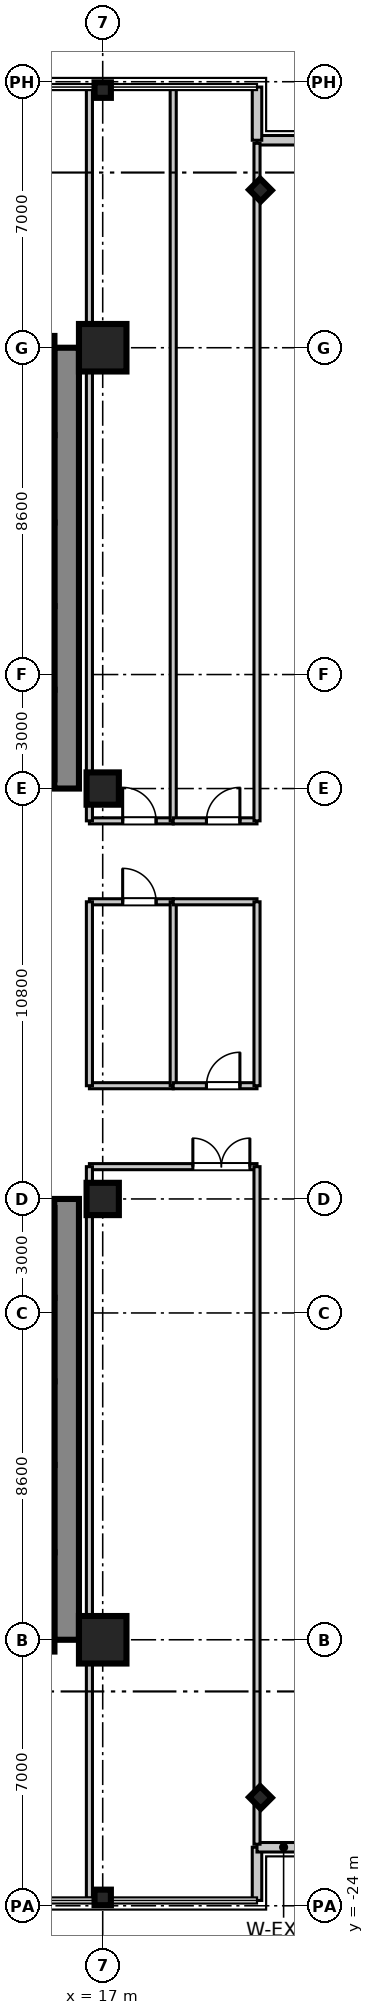
"""IFC4 building model, lengths in metres.
Left out: names, types, materials, properties, quantities, classifications, styles, units other than length and angle.
Written with IfcOpenShell. Run it as: python <this file> out.ifc"""

import sys

from ifc_helpers import new_model, si_unit, direction, frame, frame_2d, origin, origin_2d, place, context, subcontext, project, spatial, rectangle, i_section, extrude, source, transform, mapped, element, fill, save


model = new_model("IFC4")
c1 = context("Model", 3, precision=1e-05, world=origin(), true_north=direction((0.0, 1.0)))
c2 = subcontext(c1, "Body", "Model", "MODEL_VIEW")
j1 = project(units=[si_unit("LENGTHUNIT", "METRE"), si_unit("PLANEANGLEUNIT", "RADIAN")], contexts=[c1])
p1 = place(None, origin())
s1 = spatial("IfcSite", under=j1, at=p1, CompositionType="ELEMENT")
p2 = place(p1, origin())
s2 = spatial("IfcBuilding", under=s1, at=p2, CompositionType="ELEMENT")
p3 = place(p2, frame((0.0, 0.0, 95.6)))
s3 = spatial("IfcBuildingStorey", under=s2, at=p3, CompositionType="ELEMENT", Elevation=95.6)
m1 = source(origin(), c2, "Body", "SweptSolid", [
    extrude(rectangle(XDim=1.25, YDim=1.25, at=origin_2d()), origin(), (0.0, 0.0, 1.0), 3.605),
])
p4 = place(p3, frame((17.0, -17.0, 0.0), z_axis=(0.0, 0.0, 1.0), x_axis=(1.0, 0.0, 0.0)))
e1 = element("IfcColumn", 1, at=p4, inside=s3, PredefinedType="COLUMN", context=c2, shape_type="MappedRepresentation", body=[
    mapped(m1, transform((0.0, 0.0, 0.0), scale=1.0)),
])
m2 = source(origin(), c2, "Body", "SweptSolid", [
    extrude(rectangle(XDim=0.85, YDim=0.85, at=origin_2d()), origin(), (0.0, 0.0, 1.0), 3.605),
])
for number, where, z_axis, x_axis in (
    (2, (17.0, -5.4, 0.0), (0.0, 0.0, 1.0), (1.0, 0.0, 0.0)),
    (3, (17.0, 5.4, 0.0), (0.0, 0.0, 1.0), (1.0, 0.0, 0.0)),
):
    element("IfcColumn", number, at=place(p3, frame(where, z_axis=z_axis, x_axis=x_axis)), inside=s3, PredefinedType="PILASTER", context=c2, shape_type="MappedRepresentation", body=[
        mapped(m2, transform((0.0, 0.0, 0.0), scale=1.0)),
    ])
p5 = place(p3, frame((17.0, 17.0, 0.0), z_axis=(0.0, 0.0, 1.0), x_axis=(1.0, 0.0, 0.0)))
e4 = element("IfcColumn", 4, at=p5, inside=s3, PredefinedType="COLUMN", context=c2, shape_type="MappedRepresentation", body=[
    mapped(m1, transform((0.0, 0.0, 0.0), scale=1.0)),
])
m3 = source(origin(), c2, "Body", "SweptSolid", [
    extrude(i_section(OverallWidth=0.409, OverallDepth=0.43, WebThickness=0.021, FlangeThickness=0.034, at=origin_2d()), origin(), (0.0, 0.0, 1.0), 3.605),
])
for number, where, z_axis, x_axis in (
    (5, (17.0, -23.78, 0.0), (0.0, 0.0, 1.0), (0.0, 1.0, 0.0)),
    (6, (17.0, 23.78, 0.0), (0.0, 0.0, 1.0), (0.0, 1.0, 0.0)),
    (7, (21.15, -21.15, 0.0), (0.0, 0.0, 1.0), (0.707, 0.707, 0.0)),
    (8, (21.15, 21.15, 0.0), (0.0, 0.0, 1.0), (0.707, 0.707, 0.0)),
):
    element("IfcColumn", number, at=place(p3, frame(where, z_axis=z_axis, x_axis=x_axis)), inside=s3, PredefinedType="COLUMN", context=c2, shape_type="MappedRepresentation", body=[
        mapped(m3, transform((0.0, 0.0, 0.0), scale=1.0)),
    ])
m4 = source(origin(), c2, "Body", "SweptSolid", [
    extrude(rectangle(XDim=11.6, YDim=0.65, at=frame_2d((5.8, 0.0))), origin(), (0.0, 0.0, 1.0), 3.38),
])
for number, where, z_axis, x_axis in (
    (9, (16.05, 5.4, 0.0), (0.0, 0.0, 1.0), (0.0, 1.0, 0.0)),
    (10, (16.05, -17.0, 0.0), (0.0, 0.0, 1.0), (0.0, 1.0, 0.0)),
):
    element("IfcWall", number, at=place(p3, frame(where, z_axis=z_axis, x_axis=x_axis)), inside=s3, PredefinedType="SHEAR", context=c2, shape_type="MappedRepresentation", body=[
        mapped(m4, transform((0.0, 0.0, 0.0), scale=1.0)),
    ])
m5 = source(origin(), c2, "Body", "SweptSolid", [
    extrude(rectangle(XDim=2.36, YDim=0.22, at=frame_2d((1.18, 0.0))), origin(), (0.0, 0.0, 1.0), 3.38),
])
p6 = place(p3, frame((15.62, 5.64, 0.0), z_axis=(0.0, 0.0, 1.0), x_axis=(0.0, 1.0, 0.0)))
e11 = element("IfcWall", 11, at=p6, inside=s3, PredefinedType="SHEAR", context=c2, shape_type="MappedRepresentation", body=[
    mapped(m5, transform((0.0, 0.0, 0.0), scale=1.0)),
])
m6 = source(origin(), c2, "Body", "SweptSolid", [
    extrude(rectangle(XDim=2.2, YDim=0.22, at=frame_2d((1.1, 0.0))), origin(), (0.0, 0.0, 1.0), 3.38),
])
for number, where, z_axis, x_axis in (
    (12, (15.62, 8.0, 0.0), (0.0, 0.0, 1.0), (0.0, 1.0, 0.0)),
    (13, (15.62, 10.2, 0.0), (0.0, 0.0, 1.0), (0.0, 1.0, 0.0)),
):
    element("IfcWall", number, at=place(p3, frame(where, z_axis=z_axis, x_axis=x_axis)), inside=s3, PredefinedType="SHEAR", context=c2, shape_type="MappedRepresentation", body=[
        mapped(m6, transform((0.0, 0.0, 0.0), scale=1.0)),
    ])
m7 = source(origin(), c2, "Body", "SweptSolid", [
    extrude(rectangle(XDim=2.3, YDim=0.22, at=frame_2d((1.15, 0.0))), origin(), (0.0, 0.0, 1.0), 3.38),
])
p7 = place(p3, frame((15.62, 12.4, 0.0), z_axis=(0.0, 0.0, 1.0), x_axis=(0.0, 1.0, 0.0)))
e14 = element("IfcWall", 14, at=p7, inside=s3, PredefinedType="SHEAR", context=c2, shape_type="MappedRepresentation", body=[
    mapped(m7, transform((0.0, 0.0, 0.0), scale=1.0)),
])
p8 = place(p3, frame((15.62, -8.0, 0.0), z_axis=(0.0, 0.0, 1.0), x_axis=(0.0, 1.0, 0.0)))
e15 = element("IfcWall", 15, at=p8, inside=s3, PredefinedType="SHEAR", context=c2, shape_type="MappedRepresentation", body=[
    mapped(m5, transform((0.0, 0.0, 0.0), scale=1.0)),
])
for number, where, z_axis, x_axis in (
    (16, (15.62, -10.2, 0.0), (0.0, 0.0, 1.0), (0.0, 1.0, 0.0)),
    (17, (15.62, -12.4, 0.0), (0.0, 0.0, 1.0), (0.0, 1.0, 0.0)),
):
    element("IfcWall", number, at=place(p3, frame(where, z_axis=z_axis, x_axis=x_axis)), inside=s3, PredefinedType="SHEAR", context=c2, shape_type="MappedRepresentation", body=[
        mapped(m6, transform((0.0, 0.0, 0.0), scale=1.0)),
    ])
p9 = place(p3, frame((15.62, -14.7, 0.0), z_axis=(0.0, 0.0, 1.0), x_axis=(0.0, 1.0, 0.0)))
e18 = element("IfcWall", 18, at=p9, inside=s3, PredefinedType="SHEAR", context=c2, shape_type="MappedRepresentation", body=[
    mapped(m7, transform((0.0, 0.0, 0.0), scale=1.0)),
])
m8 = source(origin(), c2, "Body", "SweptSolid", [
    extrude(rectangle(XDim=2.61, YDim=0.22, at=frame_2d((1.305, 0.0))), origin(), (0.0, 0.0, 1.0), 3.38),
])
for number, where, z_axis, x_axis in (
    (19, (15.62, 14.7, 0.0), (0.0, 0.0, 1.0), (0.0, 1.0, 0.0)),
    (20, (15.62, -17.31, 0.0), (0.0, 0.0, 1.0), (0.0, 1.0, 0.0)),
):
    element("IfcWall", number, at=place(p3, frame(where, z_axis=z_axis, x_axis=x_axis)), inside=s3, PredefinedType="SHEAR", context=c2, shape_type="MappedRepresentation", body=[
        mapped(m8, transform((0.0, 0.0, 0.0), scale=1.0)),
    ])
m9 = source(origin(), c2, "Body", "SweptSolid", [
    extrude(rectangle(XDim=1.4, YDim=0.25, at=frame_2d((0.7, 0.0))), origin(), (0.0, 0.0, 1.0), 3.38),
])
p10 = place(p3, frame((21.06, -23.86, 0.0), z_axis=(0.0, 0.0, 1.0), x_axis=(0.0, 1.0, 0.0)))
e21 = element("IfcWall", 21, at=p10, inside=s3, PredefinedType="STANDARD", context=c2, shape_type="MappedRepresentation", body=[
    mapped(m9, transform((0.0, 0.0, 0.0), scale=1.0)),
])
m10 = source(origin(), c2, "Body", "SweptSolid", [
    extrude(rectangle(XDim=1.4, YDim=0.25, at=frame_2d((0.7, 0.0))), origin(), (0.0, 0.0, 1.0), 3.38),
])
for number, where, z_axis, x_axis in (
    (22, (21.06, -22.46, 0.0), (0.0, 0.0, 1.0), (1.0, 0.0, 0.0)),
    (23, (21.06, 22.46, 0.0), (0.0, 0.0, 1.0), (1.0, 0.0, 0.0)),
):
    element("IfcWall", number, at=place(p3, frame(where, z_axis=z_axis, x_axis=x_axis)), inside=s3, PredefinedType="STANDARD", context=c2, shape_type="MappedRepresentation", body=[
        mapped(m10, transform((0.0, 0.0, 0.0), scale=1.0)),
    ])
p11 = place(p3, frame((21.06, 22.46, 0.0), z_axis=(0.0, 0.0, 1.0), x_axis=(0.0, 1.0, 0.0)))
e24 = element("IfcWall", 24, at=p11, inside=s3, PredefinedType="STANDARD", context=c2, shape_type="MappedRepresentation", body=[
    mapped(m9, transform((0.0, 0.0, 0.0), scale=1.0)),
])
m11 = source(origin(), c2, "Body", "SweptSolid", [
    extrude(rectangle(XDim=2.205, YDim=0.16, at=frame_2d((1.103, 0.0))), origin(), (0.0, 0.0, 1.0), 2.72),
])
p12 = place(p3, frame((16.65, 4.55, 0.0), z_axis=(0.0, 0.0, 1.0), x_axis=(1.0, 0.0, 0.0)))
e25 = element("IfcWall", 25, at=p12, inside=s3, PredefinedType="PARTITIONING", context=c2, shape_type="MappedRepresentation", body=[
    mapped(m11, transform((0.0, 0.0, 0.0), scale=1.0)),
])
p13 = place(p12, frame((0.875, 0.0, 0.0)))
e26 = element("IfcOpeningElement", 26, at=p13, cuts=e25, PredefinedType="OPENING", context=c2, shape_type="SweptSolid", body=[
    extrude(rectangle(XDim=0.88, YDim=2.1, at=frame_2d((0.44, 1.05))), frame((0.0, 0.09, 0.0), z_axis=(0.0, -1.0, 0.0), x_axis=(1.0, 0.0, 0.0)), (0.0, 0.0, 1.0), 0.18),
])
m12 = source(origin(), c2, "Body", "SweptSolid", [
    extrude(rectangle(XDim=19.25, YDim=0.16, at=frame_2d((9.625, 0.0))), origin(), (0.0, 0.0, 1.0), 2.72),
])
for number, where, z_axis, x_axis in (
    (27, (16.65, 4.55, 0.0), (0.0, 0.0, 1.0), (0.0, 1.0, 0.0)),
    (28, (18.855, 4.55, 0.0), (0.0, 0.0, 1.0), (0.0, 1.0, 0.0)),
):
    element("IfcWall", number, at=place(p3, frame(where, z_axis=z_axis, x_axis=x_axis)), inside=s3, PredefinedType="PARTITIONING", context=c2, shape_type="MappedRepresentation", body=[
        mapped(m12, transform((0.0, 0.0, 0.0), scale=1.0)),
    ])
p14 = place(p3, frame((18.855, 4.55, 0.0), z_axis=(0.0, 0.0, 1.0), x_axis=(1.0, 0.0, 0.0)))
e29 = element("IfcWall", 29, at=p14, inside=s3, PredefinedType="PARTITIONING", context=c2, shape_type="MappedRepresentation", body=[
    mapped(m11, transform((0.0, 0.0, 0.0), scale=1.0)),
])
p15 = place(p14, frame((0.875, 0.0, 0.0)))
e30 = element("IfcOpeningElement", 30, at=p15, cuts=e29, PredefinedType="OPENING", context=c2, shape_type="SweptSolid", body=[
    extrude(rectangle(XDim=0.88, YDim=2.1, at=frame_2d((0.44, 1.05))), frame((0.0, 0.09, 0.0), z_axis=(0.0, -1.0, 0.0), x_axis=(1.0, 0.0, 0.0)), (0.0, 0.0, 1.0), 0.18),
])
m13 = source(origin(), c2, "Body", "SweptSolid", [
    extrude(rectangle(XDim=17.83, YDim=0.16, at=frame_2d((8.915, 0.0))), origin(), (0.0, 0.0, 1.0), 2.72),
])
p16 = place(p3, frame((21.06, 4.55, 0.0), z_axis=(0.0, 0.0, 1.0), x_axis=(0.0, 1.0, 0.0)))
e31 = element("IfcWall", 31, at=p16, inside=s3, PredefinedType="PARTITIONING", context=c2, shape_type="MappedRepresentation", body=[
    mapped(m13, transform((0.0, 0.0, 0.0), scale=1.0)),
])
m14 = source(origin(), c2, "Body", "SweptSolid", [
    extrude(rectangle(XDim=4.41, YDim=0.16, at=frame_2d((2.205, 0.0))), origin(), (0.0, 0.0, 1.0), 2.72),
])
p17 = place(p3, frame((16.65, -4.55, 0.0), z_axis=(0.0, 0.0, 1.0), x_axis=(1.0, 0.0, 0.0)))
e32 = element("IfcWall", 32, at=p17, inside=s3, PredefinedType="PARTITIONING", context=c2, shape_type="MappedRepresentation", body=[
    mapped(m14, transform((0.0, 0.0, 0.0), scale=1.0)),
])
p18 = place(p17, frame((2.722, 0.0, 0.0)))
e33 = element("IfcOpeningElement", 33, at=p18, cuts=e32, PredefinedType="OPENING", context=c2, shape_type="SweptSolid", body=[
    extrude(rectangle(XDim=1.5, YDim=2.15, at=frame_2d((0.75, 1.075))), frame((0.0, 0.09, 0.0), z_axis=(0.0, -1.0, 0.0), x_axis=(1.0, 0.0, 0.0)), (0.0, 0.0, 1.0), 0.18),
])
p19 = place(p3, frame((16.65, -23.8, 0.0), z_axis=(0.0, 0.0, 1.0), x_axis=(0.0, 1.0, 0.0)))
e34 = element("IfcWall", 34, at=p19, inside=s3, PredefinedType="PARTITIONING", context=c2, shape_type="MappedRepresentation", body=[
    mapped(m12, transform((0.0, 0.0, 0.0), scale=1.0)),
])
p20 = place(p3, frame((21.06, -22.38, 0.0), z_axis=(0.0, 0.0, 1.0), x_axis=(0.0, 1.0, 0.0)))
e35 = element("IfcWall", 35, at=p20, inside=s3, PredefinedType="PARTITIONING", context=c2, shape_type="MappedRepresentation", body=[
    mapped(m13, transform((0.0, 0.0, 0.0), scale=1.0)),
])
p21 = place(p3, frame((16.65, -2.42, 0.0), z_axis=(0.0, 0.0, 1.0), x_axis=(1.0, 0.0, 0.0)))
e36 = element("IfcWall", 36, at=p21, inside=s3, PredefinedType="PARTITIONING", context=c2, shape_type="MappedRepresentation", body=[
    mapped(m11, transform((0.0, 0.0, 0.0), scale=1.0)),
])
p22 = place(p3, frame((16.65, 2.42, 0.0), z_axis=(0.0, 0.0, 1.0), x_axis=(1.0, 0.0, 0.0)))
e37 = element("IfcWall", 37, at=p22, inside=s3, PredefinedType="PARTITIONING", context=c2, shape_type="MappedRepresentation", body=[
    mapped(m11, transform((0.0, 0.0, 0.0), scale=1.0)),
])
p23 = place(p22, frame((0.875, 0.0, 0.0)))
e38 = element("IfcOpeningElement", 38, at=p23, cuts=e37, PredefinedType="OPENING", context=c2, shape_type="SweptSolid", body=[
    extrude(rectangle(XDim=0.88, YDim=2.1, at=frame_2d((0.44, 1.05))), frame((0.0, 0.09, 0.0), z_axis=(0.0, -1.0, 0.0), x_axis=(1.0, 0.0, 0.0)), (0.0, 0.0, 1.0), 0.18),
])
m15 = source(origin(), c2, "Body", "SweptSolid", [
    extrude(rectangle(XDim=4.84, YDim=0.16, at=frame_2d((2.42, 0.0))), origin(), (0.0, 0.0, 1.0), 2.72),
])
for number, where, z_axis, x_axis in (
    (39, (16.65, -2.42, 0.0), (0.0, 0.0, 1.0), (0.0, 1.0, 0.0)),
    (40, (18.855, -2.42, 0.0), (0.0, 0.0, 1.0), (0.0, 1.0, 0.0)),
):
    element("IfcWall", number, at=place(p3, frame(where, z_axis=z_axis, x_axis=x_axis)), inside=s3, PredefinedType="PARTITIONING", context=c2, shape_type="MappedRepresentation", body=[
        mapped(m15, transform((0.0, 0.0, 0.0), scale=1.0)),
    ])
p24 = place(p3, frame((18.855, -2.42, 0.0), z_axis=(0.0, 0.0, 1.0), x_axis=(1.0, 0.0, 0.0)))
e41 = element("IfcWall", 41, at=p24, inside=s3, PredefinedType="PARTITIONING", context=c2, shape_type="MappedRepresentation", body=[
    mapped(m11, transform((0.0, 0.0, 0.0), scale=1.0)),
])
p25 = place(p24, frame((0.875, 0.0, 0.0)))
e42 = element("IfcOpeningElement", 42, at=p25, cuts=e41, PredefinedType="OPENING", context=c2, shape_type="SweptSolid", body=[
    extrude(rectangle(XDim=0.88, YDim=2.1, at=frame_2d((0.44, 1.05))), frame((0.0, 0.09, 0.0), z_axis=(0.0, -1.0, 0.0), x_axis=(1.0, 0.0, 0.0)), (0.0, 0.0, 1.0), 0.18),
])
p26 = place(p3, frame((18.855, 2.42, 0.0), z_axis=(0.0, 0.0, 1.0), x_axis=(1.0, 0.0, 0.0)))
e43 = element("IfcWall", 43, at=p26, inside=s3, PredefinedType="PARTITIONING", context=c2, shape_type="MappedRepresentation", body=[
    mapped(m11, transform((0.0, 0.0, 0.0), scale=1.0)),
])
p27 = place(p3, frame((21.06, -2.42, 0.0), z_axis=(0.0, 0.0, 1.0), x_axis=(0.0, 1.0, 0.0)))
e44 = element("IfcWall", 44, at=p27, inside=s3, PredefinedType="PARTITIONING", context=c2, shape_type="MappedRepresentation", body=[
    mapped(m15, transform((0.0, 0.0, 0.0), scale=1.0)),
])
m16 = source(origin(), c2, "Body", "SweptSolid", [
    extrude(rectangle(XDim=0.88, YDim=2.1, at=frame_2d((0.44, 1.05))), frame((0.0, 0.025, 0.0), z_axis=(0.0, -1.0, 0.0), x_axis=(1.0, 0.0, 0.0)), (0.0, 0.0, 1.0), 0.05),
])
p28 = place(p13, origin())
e45 = element("IfcDoor", 45, at=p28, inside=s3, OperationType="SINGLE_SWING_LEFT", PredefinedType="DOOR", context=c2, shape_type="MappedRepresentation", body=[
    mapped(m16, transform((0.0, 0.0, 0.0), scale=1.0)),
])
fill(e26, e45)
p29 = place(p15, origin())
e46 = element("IfcDoor", 46, at=p29, inside=s3, OperationType="SINGLE_SWING_RIGHT", PredefinedType="DOOR", context=c2, shape_type="MappedRepresentation", body=[
    mapped(m16, transform((0.0, 0.0, 0.0), scale=1.0)),
])
fill(e30, e46)
m17 = source(origin(), c2, "Body", "SweptSolid", [
    extrude(rectangle(XDim=1.5, YDim=2.15, at=frame_2d((0.75, 1.075))), frame((0.0, 0.025, 0.0), z_axis=(0.0, -1.0, 0.0), x_axis=(1.0, 0.0, 0.0)), (0.0, 0.0, 1.0), 0.05),
])
p30 = place(p18, frame((1.5, 0.0, 0.0), z_axis=(0.0, 0.0, 1.0), x_axis=(-1.0, 0.0, 0.0)))
e47 = element("IfcDoor", 47, at=p30, inside=s3, OperationType="DOUBLE_DOOR_SINGLE_SWING", PredefinedType="DOOR", context=c2, shape_type="MappedRepresentation", body=[
    mapped(m17, transform((0.0, 0.0, 0.0), scale=1.0)),
])
fill(e33, e47)
p31 = place(p23, frame((0.88, 0.0, 0.0), z_axis=(0.0, 0.0, 1.0), x_axis=(-1.0, 0.0, 0.0)))
e48 = element("IfcDoor", 48, at=p31, inside=s3, OperationType="SINGLE_SWING_LEFT", PredefinedType="DOOR", context=c2, shape_type="MappedRepresentation", body=[
    mapped(m16, transform((0.0, 0.0, 0.0), scale=1.0)),
])
fill(e38, e48)
p32 = place(p25, origin())
e49 = element("IfcDoor", 49, at=p32, inside=s3, OperationType="SINGLE_SWING_RIGHT", PredefinedType="DOOR", context=c2, shape_type="MappedRepresentation", body=[
    mapped(m16, transform((0.0, 0.0, 0.0), scale=1.0)),
])
fill(e42, e49)
save(model, sys.argv[1])
